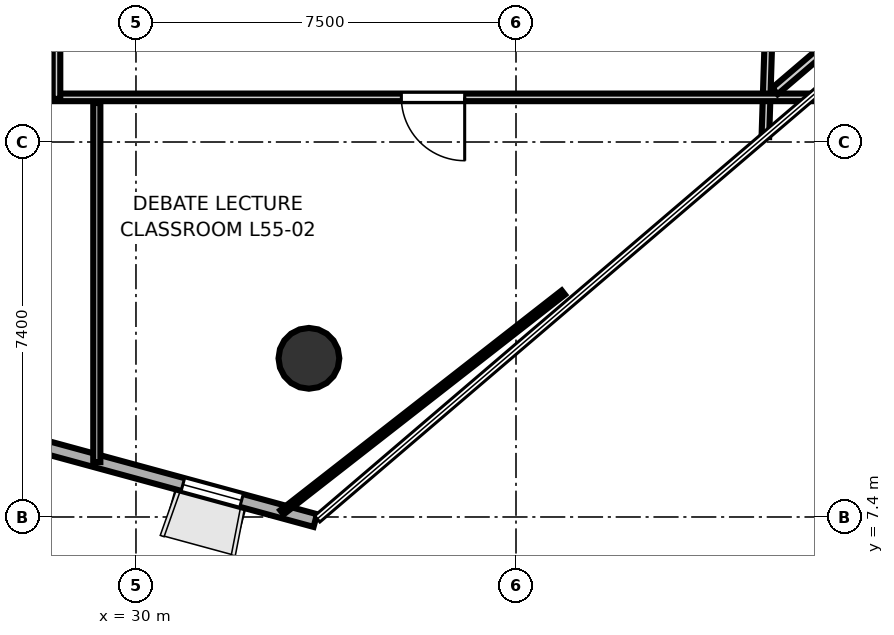
"""IFC4 building model, lengths in metres.
Left out: names, types, materials, properties, quantities, classifications, styles, units other than length and angle.
Written with IfcOpenShell. Run it as: python <this file> out.ifc"""

import sys

from ifc_helpers import new_model, si_unit, direction, frame, frame_2d, origin, origin_2d, place, context, subcontext, project, spatial, rectangle, hollow_circle, extrude, element, fill, save


model = new_model("IFC4")
c1 = context("Model", 3, precision=1e-05, world=origin(), true_north=direction((0.0, 1.0)))
c2 = subcontext(c1, "Body", "Model", "MODEL_VIEW")
j1 = project(units=[si_unit("LENGTHUNIT", "METRE"), si_unit("PLANEANGLEUNIT", "RADIAN")], contexts=[c1])
p1 = place(None, origin())
s1 = spatial("IfcSite", under=j1, at=p1, CompositionType="ELEMENT")
p2 = place(p1, origin())
s2 = spatial("IfcBuilding", under=s1, at=p2, CompositionType="ELEMENT")
p3 = place(p2, frame((0.0, 0.0, 215.1)))
s3 = spatial("IfcBuildingStorey", under=s2, at=p3, CompositionType="ELEMENT", Elevation=215.1)
p4 = place(p3, frame((33.413, 10.531, 0.0), z_axis=(0.0, 0.0, 1.0), x_axis=(1.0, 0.0, 0.0)))
e1 = element("IfcColumn", 1, at=p4, inside=s3, PredefinedType="COLUMN", context=c2, shape_type="SweptSolid", body=[
    extrude(hollow_circle(Radius=0.6, WallThickness=0.03, at=origin_2d()), origin(), (0.0, 0.0, 1.0), 3.7),
])
p5 = place(p3, frame((26.758, 9.175, 0.0), z_axis=(0.0, 0.0, 1.0), x_axis=(0.964898373598, -0.262623549265, 0.0)))
e2 = element("IfcWall", 2, at=p5, inside=s3, PredefinedType="SOLIDWALL", context=c2, shape_type="SweptSolid", body=[
    extrude(rectangle(XDim=7.028, YDim=0.26, at=frame_2d((3.514, 0.0))), origin(), (0.0, 0.0, 1.0), 3.52),
])
p6 = place(p5, frame((4.32, 0.0, 0.9)))
e3 = element("IfcOpeningElement", 3, at=p6, cuts=e2, PredefinedType="OPENING", context=c2, shape_type="SweptSolid", body=[
    extrude(rectangle(XDim=1.2, YDim=2.0, at=frame_2d((0.6, 1.0))), frame((0.0, 0.14, 0.0), z_axis=(0.0, -1.0, 0.0), x_axis=(1.0, 0.0, 0.0)), (0.0, 0.0, 1.0), 0.28),
])
p7 = place(p3, frame((42.519, 17.981, 0.0), z_axis=(0.0, 0.0, 1.0), x_axis=(-0.031677304437, -0.999498148264, 0.0)))
e4 = element("IfcWall", 4, at=p7, inside=s3, PredefinedType="PARTITIONING", context=c2, shape_type="SweptSolid", body=[
    extrude(rectangle(XDim=3.083, YDim=0.15, at=frame_2d((1.542, 0.0))), origin(), (0.0, 0.0, 1.0), 2.84),
])
p8 = place(p3, frame((43.333, 15.681, 0.0), z_axis=(0.0, 0.0, 1.0), x_axis=(-1.0, 0.0, 0.0)))
e5 = element("IfcWall", 5, at=p8, inside=s3, PredefinedType="PARTITIONING", context=c2, shape_type="SweptSolid", body=[
    extrude(rectangle(XDim=14.933, YDim=0.15, at=frame_2d((7.467, 0.0))), origin(), (0.0, 0.0, 1.0), 2.84),
])
p9 = place(p8, frame((6.846, 0.0, 0.0)))
e6 = element("IfcOpeningElement", 6, at=p9, cuts=e5, PredefinedType="OPENING", context=c2, shape_type="SweptSolid", body=[
    extrude(rectangle(XDim=1.25, YDim=2.2, at=frame_2d((0.625, 1.1))), frame((0.0, 0.085, 0.0), z_axis=(0.0, -1.0, 0.0), x_axis=(1.0, 0.0, 0.0)), (0.0, 0.0, 1.0), 0.17),
])
p10 = place(p3, frame((28.431, 15.65, 0.0), z_axis=(0.0, 0.0, 1.0), x_axis=(0.0, 1.0, 0.0)))
e7 = element("IfcWall", 7, at=p10, inside=s3, PredefinedType="PARTITIONING", context=c2, shape_type="SweptSolid", body=[
    extrude(rectangle(XDim=2.4, YDim=0.15, at=frame_2d((1.2, 0.0))), origin(), (0.0, 0.0, 1.0), 2.84),
])
p11 = place(p3, frame((29.227, 15.57, 0.0), z_axis=(0.0, 0.0, 1.0), x_axis=(0.0, -1.0, 0.0)))
e8 = element("IfcWall", 8, at=p11, inside=s3, PredefinedType="PARTITIONING", context=c2, shape_type="SweptSolid", body=[
    extrude(rectangle(XDim=7.087, YDim=0.14, at=frame_2d((3.543, 0.0))), origin(), (0.0, 0.0, 1.0), 2.84),
])
p12 = place(p3, frame((38.434, 11.828, 0.0), z_axis=(0.0, 0.0, 1.0), x_axis=(-0.788190339819, -0.615431546328, 0.0)))
e9 = element("IfcWall", 9, at=p12, inside=s3, PredefinedType="PARTITIONING", context=c2, shape_type="SweptSolid", body=[
    extrude(rectangle(XDim=7.046, YDim=0.105, at=frame_2d((3.523, 0.0))), origin(), (0.0, 0.0, 1.0), 2.84),
])
p13 = place(p3, frame((53.7, 25.281, 0.0), z_axis=(0.0, 0.0, 1.0), x_axis=(-0.760261052986, -0.64961768088, 0.0)))
e10 = element("IfcWall", 10, at=p13, inside=s3, PredefinedType="PLUMBINGWALL", context=c2, shape_type="SweptSolid", body=[
    extrude(rectangle(XDim=14.588, YDim=0.165, at=frame_2d((7.294, 0.0))), origin(), (0.0, 0.0, 1.0), 2.84),
])
p14 = place(p9, origin())
e11 = element("IfcDoor", 11, at=p14, inside=s3, OperationType="SINGLE_SWING_LEFT", PredefinedType="DOOR", context=c2, shape_type="SweptSolid", body=[
    extrude(rectangle(XDim=1.25, YDim=2.2, at=frame_2d((0.625, 1.1))), frame((0.0, 0.025, 0.0), z_axis=(0.0, -1.0, 0.0), x_axis=(1.0, 0.0, 0.0)), (0.0, 0.0, 1.0), 0.05),
])
fill(e6, e11)
p15 = place(p6, origin())
e12 = element("IfcWindow", 12, at=p15, inside=s3, PartitioningType="SINGLE_PANEL", PredefinedType="WINDOW", context=c2, shape_type="SweptSolid", body=[
    extrude(rectangle(XDim=1.2, YDim=2.0, at=frame_2d((0.6, 1.0))), frame((0.0, 0.03, 0.0), z_axis=(0.0, -1.0, 0.0), x_axis=(1.0, 0.0, 0.0)), (0.0, 0.0, 1.0), 0.06),
])
fill(e3, e12)
save(model, sys.argv[1])
